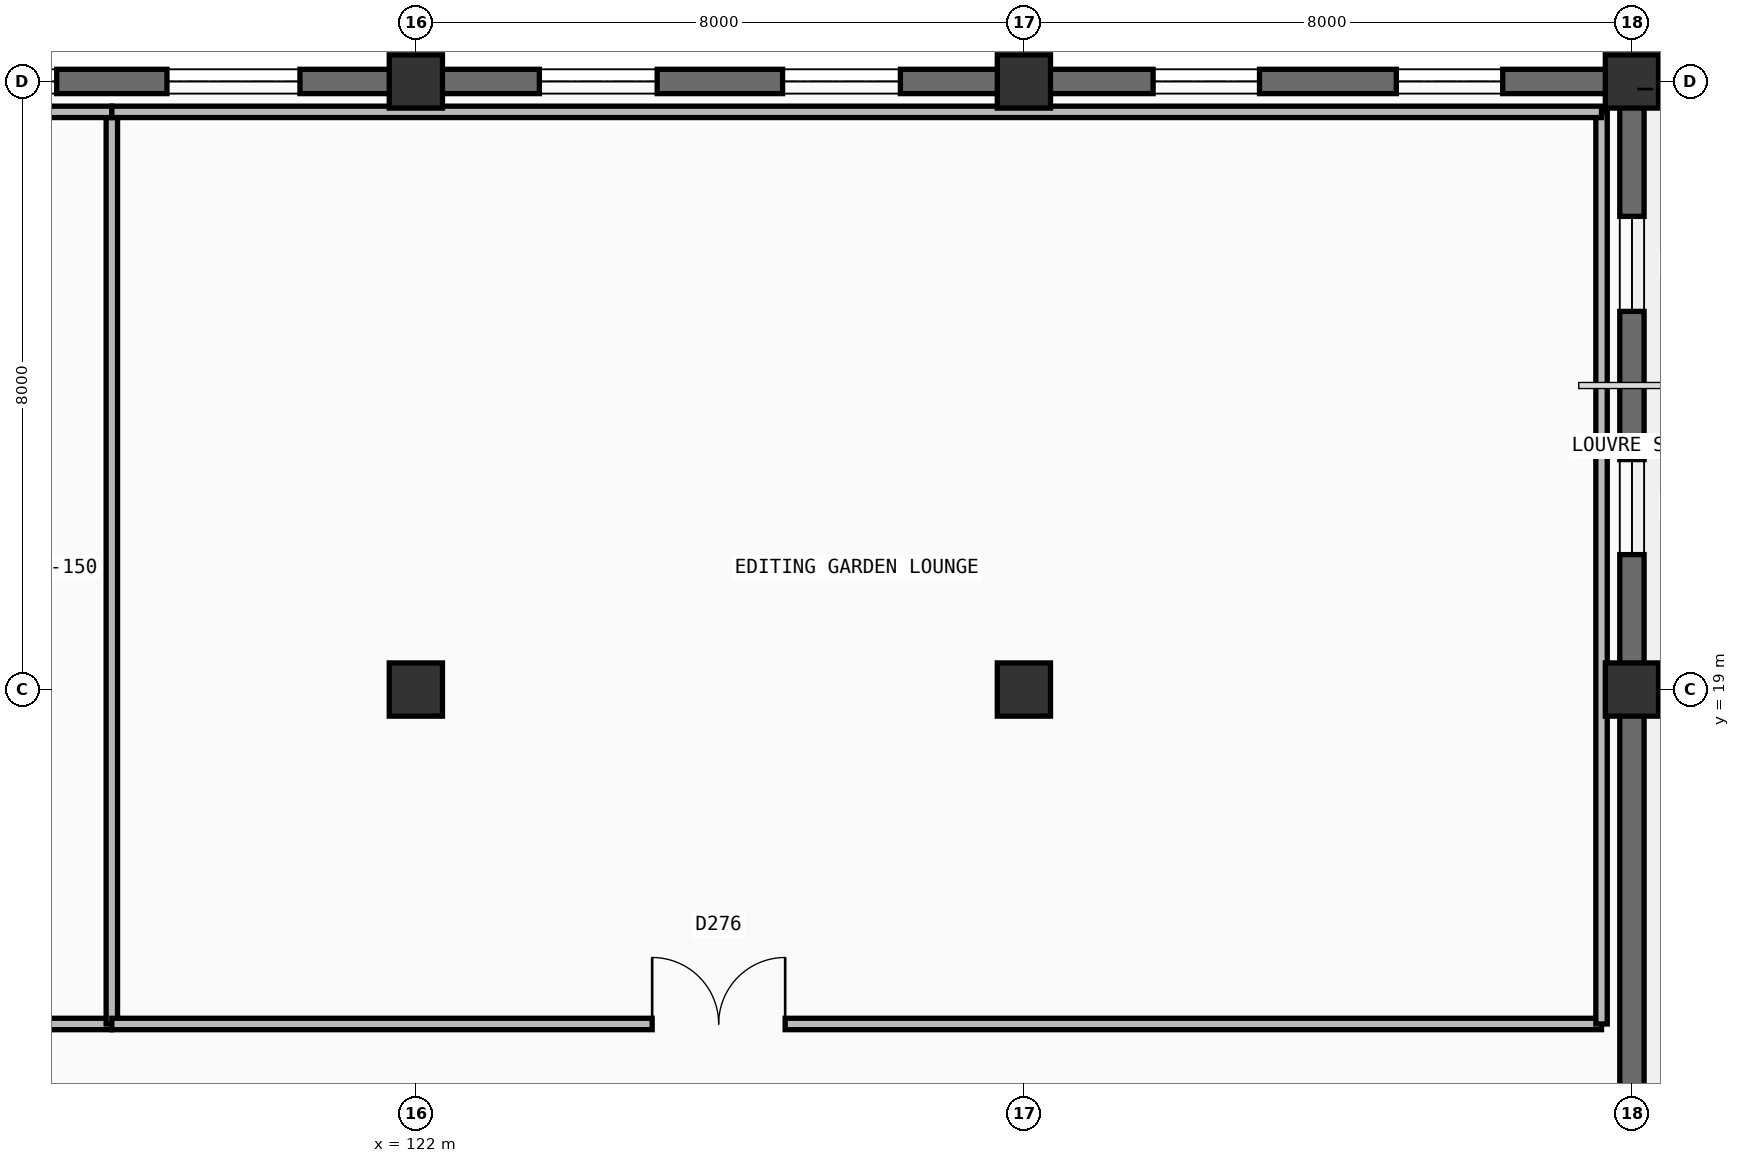
"""IFC4 building model, lengths in metres.
Left out: names, types, materials, properties, quantities, classifications, styles, units other than length and angle.
Written with IfcOpenShell. Run it as: python <this file> out.ifc"""

import sys

from ifc_helpers import new_model, si_unit, direction, frame, frame_2d, origin, origin_2d, place, context, subcontext, project, spatial, rectangle, extrude, element, fill, save


model = new_model("IFC4")
c1 = context("Model", 3, precision=1e-05, world=origin(), true_north=direction((0.0, 1.0)))
c2 = subcontext(c1, "Body", "Model", "MODEL_VIEW")
j1 = project(units=[si_unit("LENGTHUNIT", "METRE"), si_unit("PLANEANGLEUNIT", "RADIAN")], contexts=[c1])
p1 = place(None, origin())
s1 = spatial("IfcSite", under=j1, at=p1, CompositionType="ELEMENT")
p2 = place(p1, origin())
s2 = spatial("IfcBuilding", under=s1, at=p2, CompositionType="ELEMENT")
p3 = place(p2, frame((0.0, 0.0, 9.9)))
s3 = spatial("IfcBuildingStorey", under=s2, at=p3, CompositionType="ELEMENT", Elevation=9.9)
for number, where, z_axis, x_axis in (
    (1, (122.0, 19.0, 0.0), (0.0, 0.0, 1.0), (1.0, 0.0, 0.0)),
    (2, (122.0, 27.0, 0.0), (0.0, 0.0, 1.0), (1.0, 0.0, 0.0)),
    (3, (130.0, 19.0, 0.0), (0.0, 0.0, 1.0), (1.0, 0.0, 0.0)),
    (4, (130.0, 27.0, 0.0), (0.0, 0.0, 1.0), (1.0, 0.0, 0.0)),
    (5, (138.0, 19.0, 0.0), (0.0, 0.0, 1.0), (1.0, 0.0, 0.0)),
    (6, (138.0, 27.0, 0.0), (0.0, 0.0, 1.0), (1.0, 0.0, 0.0)),
):
    element("IfcColumn", number, at=place(p3, frame(where, z_axis=z_axis, x_axis=x_axis)), inside=s3, PredefinedType="COLUMN", context=c2, shape_type="SweptSolid", body=[
        extrude(rectangle(XDim=0.7, YDim=0.7, at=origin_2d()), origin(), (0.0, 0.0, 1.0), 4.5),
    ])
p4 = place(p3, frame((114.0, 27.0, 0.0), z_axis=(0.0, 0.0, 1.0), x_axis=(1.0, 0.0, 0.0)))
e7 = element("IfcWall", 7, at=p4, inside=s3, PredefinedType="SOLIDWALL", context=c2, shape_type="SweptSolid", body=[
    extrude(rectangle(XDim=8.0, YDim=0.32, at=frame_2d((4.0, 0.0))), origin(), (0.0, 0.0, 1.0), 4.5),
])
p5 = place(p4, frame((1.525, 0.0, 1.0)))
e8 = element("IfcOpeningElement", 8, at=p5, cuts=e7, PredefinedType="OPENING", context=c2, shape_type="SweptSolid", body=[
    extrude(rectangle(XDim=1.75, YDim=2.1, at=frame_2d((0.875, 1.05))), frame((0.0, 0.17, 0.0), z_axis=(0.0, -1.0, 0.0), x_axis=(1.0, 0.0, 0.0)), (0.0, 0.0, 1.0), 0.34),
])
p6 = place(p4, frame((4.725, 0.0, 1.0)))
e9 = element("IfcOpeningElement", 9, at=p6, cuts=e7, PredefinedType="OPENING", context=c2, shape_type="SweptSolid", body=[
    extrude(rectangle(XDim=1.75, YDim=2.1, at=frame_2d((0.875, 1.05))), frame((0.0, 0.17, 0.0), z_axis=(0.0, -1.0, 0.0), x_axis=(1.0, 0.0, 0.0)), (0.0, 0.0, 1.0), 0.34),
])
p7 = place(p3, frame((122.0, 27.0, 0.0), z_axis=(0.0, 0.0, 1.0), x_axis=(1.0, 0.0, 0.0)))
e10 = element("IfcWall", 10, at=p7, inside=s3, PredefinedType="SOLIDWALL", context=c2, shape_type="SweptSolid", body=[
    extrude(rectangle(XDim=8.0, YDim=0.32, at=frame_2d((4.0, 0.0))), origin(), (0.0, 0.0, 1.0), 4.5),
])
p8 = place(p7, frame((1.625, 0.0, 1.0)))
e11 = element("IfcOpeningElement", 11, at=p8, cuts=e10, PredefinedType="OPENING", context=c2, shape_type="SweptSolid", body=[
    extrude(rectangle(XDim=1.55, YDim=1.95, at=frame_2d((0.775, 0.975))), frame((0.0, 0.17, 0.0), z_axis=(0.0, -1.0, 0.0), x_axis=(1.0, 0.0, 0.0)), (0.0, 0.0, 1.0), 0.34),
])
p9 = place(p7, frame((4.825, 0.0, 1.0)))
e12 = element("IfcOpeningElement", 12, at=p9, cuts=e10, PredefinedType="OPENING", context=c2, shape_type="SweptSolid", body=[
    extrude(rectangle(XDim=1.55, YDim=1.95, at=frame_2d((0.775, 0.975))), frame((0.0, 0.17, 0.0), z_axis=(0.0, -1.0, 0.0), x_axis=(1.0, 0.0, 0.0)), (0.0, 0.0, 1.0), 0.34),
])
p10 = place(p3, frame((130.0, 27.0, 0.0), z_axis=(0.0, 0.0, 1.0), x_axis=(1.0, 0.0, 0.0)))
e13 = element("IfcWall", 13, at=p10, inside=s3, PredefinedType="SOLIDWALL", context=c2, shape_type="SweptSolid", body=[
    extrude(rectangle(XDim=8.0, YDim=0.32, at=frame_2d((4.0, 0.0))), origin(), (0.0, 0.0, 1.0), 4.5),
])
p11 = place(p10, frame((1.7, 0.0, 1.0)))
e14 = element("IfcOpeningElement", 14, at=p11, cuts=e13, PredefinedType="OPENING", context=c2, shape_type="SweptSolid", body=[
    extrude(rectangle(XDim=1.4, YDim=1.75, at=frame_2d((0.7, 0.875))), frame((0.0, 0.17, 0.0), z_axis=(0.0, -1.0, 0.0), x_axis=(1.0, 0.0, 0.0)), (0.0, 0.0, 1.0), 0.34),
])
p12 = place(p10, frame((4.9, 0.0, 1.0)))
e15 = element("IfcOpeningElement", 15, at=p12, cuts=e13, PredefinedType="OPENING", context=c2, shape_type="SweptSolid", body=[
    extrude(rectangle(XDim=1.4, YDim=1.75, at=frame_2d((0.7, 0.875))), frame((0.0, 0.17, 0.0), z_axis=(0.0, -1.0, 0.0), x_axis=(1.0, 0.0, 0.0)), (0.0, 0.0, 1.0), 0.34),
])
p13 = place(p3, frame((138.0, 27.0, 0.0), z_axis=(0.0, 0.0, 1.0), x_axis=(0.0, -1.0, 0.0)))
e16 = element("IfcWall", 16, at=p13, inside=s3, PredefinedType="SOLIDWALL", context=c2, shape_type="SweptSolid", body=[
    extrude(rectangle(XDim=8.0, YDim=0.32, at=frame_2d((4.0, 0.0))), origin(), (0.0, 0.0, 1.0), 4.5),
])
p14 = place(p13, frame((1.775, 0.0, 1.0)))
e17 = element("IfcOpeningElement", 17, at=p14, cuts=e16, PredefinedType="OPENING", context=c2, shape_type="SweptSolid", body=[
    extrude(rectangle(XDim=1.25, YDim=1.6, at=frame_2d((0.625, 0.8))), frame((0.0, 0.17, 0.0), z_axis=(0.0, -1.0, 0.0), x_axis=(1.0, 0.0, 0.0)), (0.0, 0.0, 1.0), 0.34),
])
p15 = place(p13, frame((4.975, 0.0, 1.0)))
e18 = element("IfcOpeningElement", 18, at=p15, cuts=e16, PredefinedType="OPENING", context=c2, shape_type="SweptSolid", body=[
    extrude(rectangle(XDim=1.25, YDim=1.6, at=frame_2d((0.625, 0.8))), frame((0.0, 0.17, 0.0), z_axis=(0.0, -1.0, 0.0), x_axis=(1.0, 0.0, 0.0)), (0.0, 0.0, 1.0), 0.34),
])
p16 = place(p3, frame((138.0, 19.0, 0.0), z_axis=(0.0, 0.0, 1.0), x_axis=(0.0, -1.0, 0.0)))
e19 = element("IfcWall", 19, at=p16, inside=s3, PredefinedType="SOLIDWALL", context=c2, shape_type="SweptSolid", body=[
    extrude(rectangle(XDim=8.0, YDim=0.32, at=frame_2d((4.0, 0.0))), origin(), (0.0, 0.0, 1.0), 4.5),
])
p17 = place(p16, frame((5.45, 0.0, 0.0)))
e20 = element("IfcOpeningElement", 20, at=p17, cuts=e19, PredefinedType="OPENING", context=c2, shape_type="SweptSolid", body=[
    extrude(rectangle(XDim=1.5, YDim=2.25, at=frame_2d((0.75, 1.125))), frame((0.0, 0.17, 0.0), z_axis=(0.0, -1.0, 0.0), x_axis=(1.0, 0.0, 0.0)), (0.0, 0.0, 1.0), 0.34),
])
p18 = place(p3, frame((98.4, 14.6, 0.0), z_axis=(0.0, 0.0, 1.0), x_axis=(1.0, 0.0, 0.0)))
e21 = element("IfcWall", 21, at=p18, inside=s3, PredefinedType="PARTITIONING", context=c2, shape_type="SweptSolid", body=[
    extrude(rectangle(XDim=19.6, YDim=0.15, at=frame_2d((9.8, 0.0))), origin(), (0.0, 0.0, 1.0), 4.2),
])
p19 = place(p18, frame((11.035, 0.0, 0.0)))
e22 = element("IfcOpeningElement", 22, at=p19, cuts=e21, PredefinedType="OPENING", context=c2, shape_type="SweptSolid", body=[
    extrude(rectangle(XDim=1.15, YDim=2.2, at=frame_2d((0.575, 1.1))), frame((0.0, 0.085, 0.0), z_axis=(0.0, -1.0, 0.0), x_axis=(1.0, 0.0, 0.0)), (0.0, 0.0, 1.0), 0.17),
])
p20 = place(p3, frame((118.0, 14.6, 0.0), z_axis=(0.0, 0.0, 1.0), x_axis=(0.0, 1.0, 0.0)))
e23 = element("IfcWall", 23, at=p20, inside=s3, PredefinedType="PARTITIONING", context=c2, shape_type="SweptSolid", body=[
    extrude(rectangle(XDim=12.0, YDim=0.15, at=frame_2d((6.0, 0.0))), origin(), (0.0, 0.0, 1.0), 4.2),
])
p21 = place(p3, frame((98.4, 26.6, 0.0), z_axis=(0.0, 0.0, 1.0), x_axis=(1.0, 0.0, 0.0)))
e24 = element("IfcWall", 24, at=p21, inside=s3, PredefinedType="PARTITIONING", context=c2, shape_type="SweptSolid", body=[
    extrude(rectangle(XDim=19.6, YDim=0.15, at=frame_2d((9.8, 0.0))), origin(), (0.0, 0.0, 1.0), 4.2),
])
p22 = place(p3, frame((118.0, 14.6, 0.0), z_axis=(0.0, 0.0, 1.0), x_axis=(1.0, 0.0, 0.0)))
e25 = element("IfcWall", 25, at=p22, inside=s3, PredefinedType="PARTITIONING", context=c2, shape_type="SweptSolid", body=[
    extrude(rectangle(XDim=19.6, YDim=0.15, at=frame_2d((9.8, 0.0))), origin(), (0.0, 0.0, 1.0), 4.2),
])
p23 = place(p22, frame((7.109, 0.0, 0.0)))
e26 = element("IfcOpeningElement", 26, at=p23, cuts=e25, PredefinedType="OPENING", context=c2, shape_type="SweptSolid", body=[
    extrude(rectangle(XDim=1.75, YDim=2.3, at=frame_2d((0.875, 1.15))), frame((0.0, 0.085, 0.0), z_axis=(0.0, -1.0, 0.0), x_axis=(1.0, 0.0, 0.0)), (0.0, 0.0, 1.0), 0.17),
])
p24 = place(p3, frame((137.6, 14.6, 0.0), z_axis=(0.0, 0.0, 1.0), x_axis=(0.0, 1.0, 0.0)))
e27 = element("IfcWall", 27, at=p24, inside=s3, PredefinedType="PARTITIONING", context=c2, shape_type="SweptSolid", body=[
    extrude(rectangle(XDim=12.0, YDim=0.15, at=frame_2d((6.0, 0.0))), origin(), (0.0, 0.0, 1.0), 4.2),
])
p25 = place(p3, frame((118.0, 26.6, 0.0), z_axis=(0.0, 0.0, 1.0), x_axis=(1.0, 0.0, 0.0)))
e28 = element("IfcWall", 28, at=p25, inside=s3, PredefinedType="PARTITIONING", context=c2, shape_type="SweptSolid", body=[
    extrude(rectangle(XDim=19.6, YDim=0.15, at=frame_2d((9.8, 0.0))), origin(), (0.0, 0.0, 1.0), 4.2),
])
p26 = place(p5, origin())
e29 = element("IfcWindow", 29, at=p26, inside=s3, PartitioningType="SINGLE_PANEL", PredefinedType="WINDOW", context=c2, shape_type="SweptSolid", body=[
    extrude(rectangle(XDim=1.75, YDim=2.1, at=frame_2d((0.875, 1.05))), frame((0.0, 0.03, 0.0), z_axis=(0.0, -1.0, 0.0), x_axis=(1.0, 0.0, 0.0)), (0.0, 0.0, 1.0), 0.06),
])
fill(e8, e29)
p27 = place(p6, origin())
e30 = element("IfcWindow", 30, at=p27, inside=s3, PartitioningType="SINGLE_PANEL", PredefinedType="WINDOW", context=c2, shape_type="SweptSolid", body=[
    extrude(rectangle(XDim=1.75, YDim=2.1, at=frame_2d((0.875, 1.05))), frame((0.0, 0.03, 0.0), z_axis=(0.0, -1.0, 0.0), x_axis=(1.0, 0.0, 0.0)), (0.0, 0.0, 1.0), 0.06),
])
fill(e9, e30)
p28 = place(p8, origin())
e31 = element("IfcWindow", 31, at=p28, inside=s3, PartitioningType="SINGLE_PANEL", PredefinedType="WINDOW", context=c2, shape_type="SweptSolid", body=[
    extrude(rectangle(XDim=1.55, YDim=1.95, at=frame_2d((0.775, 0.975))), frame((0.0, 0.03, 0.0), z_axis=(0.0, -1.0, 0.0), x_axis=(1.0, 0.0, 0.0)), (0.0, 0.0, 1.0), 0.06),
])
fill(e11, e31)
p29 = place(p9, origin())
e32 = element("IfcWindow", 32, at=p29, inside=s3, PartitioningType="SINGLE_PANEL", PredefinedType="WINDOW", context=c2, shape_type="SweptSolid", body=[
    extrude(rectangle(XDim=1.55, YDim=1.95, at=frame_2d((0.775, 0.975))), frame((0.0, 0.03, 0.0), z_axis=(0.0, -1.0, 0.0), x_axis=(1.0, 0.0, 0.0)), (0.0, 0.0, 1.0), 0.06),
])
fill(e12, e32)
p30 = place(p11, origin())
e33 = element("IfcWindow", 33, at=p30, inside=s3, PartitioningType="SINGLE_PANEL", PredefinedType="WINDOW", context=c2, shape_type="SweptSolid", body=[
    extrude(rectangle(XDim=1.4, YDim=1.75, at=frame_2d((0.7, 0.875))), frame((0.0, 0.03, 0.0), z_axis=(0.0, -1.0, 0.0), x_axis=(1.0, 0.0, 0.0)), (0.0, 0.0, 1.0), 0.06),
])
fill(e14, e33)
p31 = place(p12, origin())
e34 = element("IfcWindow", 34, at=p31, inside=s3, PartitioningType="SINGLE_PANEL", PredefinedType="WINDOW", context=c2, shape_type="SweptSolid", body=[
    extrude(rectangle(XDim=1.4, YDim=1.75, at=frame_2d((0.7, 0.875))), frame((0.0, 0.03, 0.0), z_axis=(0.0, -1.0, 0.0), x_axis=(1.0, 0.0, 0.0)), (0.0, 0.0, 1.0), 0.06),
])
fill(e15, e34)
p32 = place(p14, origin())
e35 = element("IfcWindow", 35, at=p32, inside=s3, PartitioningType="SINGLE_PANEL", PredefinedType="WINDOW", context=c2, shape_type="SweptSolid", body=[
    extrude(rectangle(XDim=1.25, YDim=1.6, at=frame_2d((0.625, 0.8))), frame((0.0, 0.03, 0.0), z_axis=(0.0, -1.0, 0.0), x_axis=(1.0, 0.0, 0.0)), (0.0, 0.0, 1.0), 0.06),
])
fill(e17, e35)
p33 = place(p15, origin())
e36 = element("IfcWindow", 36, at=p33, inside=s3, PartitioningType="SINGLE_PANEL", PredefinedType="WINDOW", context=c2, shape_type="SweptSolid", body=[
    extrude(rectangle(XDim=1.25, YDim=1.6, at=frame_2d((0.625, 0.8))), frame((0.0, 0.03, 0.0), z_axis=(0.0, -1.0, 0.0), x_axis=(1.0, 0.0, 0.0)), (0.0, 0.0, 1.0), 0.06),
])
fill(e18, e36)
p34 = place(p23, origin())
e37 = element("IfcDoor", 37, at=p34, inside=s3, OperationType="DOUBLE_DOOR_SINGLE_SWING", PredefinedType="DOOR", context=c2, shape_type="SweptSolid", body=[
    extrude(rectangle(XDim=1.75, YDim=2.3, at=frame_2d((0.875, 1.15))), frame((0.0, 0.025, 0.0), z_axis=(0.0, -1.0, 0.0), x_axis=(1.0, 0.0, 0.0)), (0.0, 0.0, 1.0), 0.05),
])
fill(e26, e37)
save(model, sys.argv[1])
